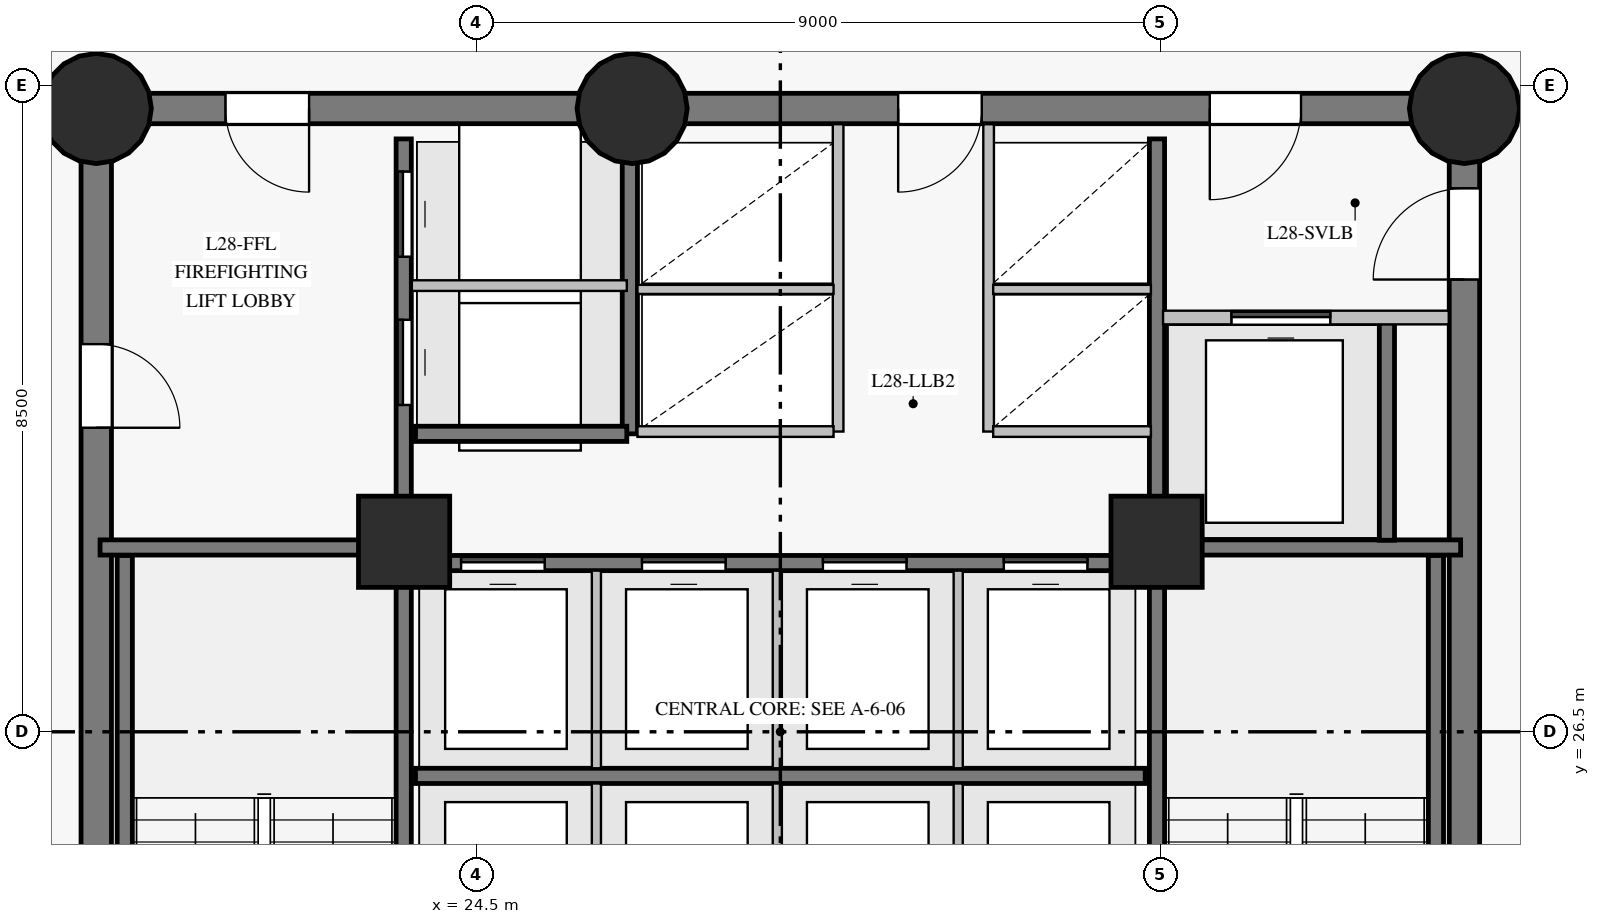
"""IFC4 building model, lengths in metres.
Left out: names, types, materials, properties, quantities, classifications, styles, units other than length and angle.
Written with IfcOpenShell. Run it as: python <this file> out.ifc"""

import sys

from ifc_helpers import new_model, si_unit, direction, frame, frame_2d, origin, origin_with_axes, origin_2d, place, context, subcontext, project, spatial, rectangle, circle, extrude, source, transform, mapped, element, fill, save


model = new_model("IFC4")
c1 = context("Model", 3, precision=1e-05, world=origin(), true_north=direction((0.0, 1.0)))
c2 = subcontext(c1, "Body", "Model", "MODEL_VIEW")
j1 = project(units=[si_unit("LENGTHUNIT", "METRE"), si_unit("PLANEANGLEUNIT", "RADIAN")], contexts=[c1])
p1 = place(None, origin())
s1 = spatial("IfcSite", under=j1, at=p1, CompositionType="ELEMENT")
p2 = place(p1, origin())
s2 = spatial("IfcBuilding", under=s1, at=p2, CompositionType="ELEMENT")
p3 = place(p2, frame((0.0, 0.0, 105.35)))
s3 = spatial("IfcBuildingStorey", under=s2, at=p3, CompositionType="ELEMENT", Elevation=105.35)
p4 = place(p3, frame((37.5, 18.3, 0.0), z_axis=(0.0, 0.0, 1.0), x_axis=(0.0, 1.0, 0.0)))
e1 = element("IfcWall", 1, at=p4, inside=s3, PredefinedType="SHEAR", context=c2, shape_type="SweptSolid", body=[
    extrude(rectangle(XDim=16.4, YDim=0.4, at=frame_2d((8.2, 0.0))), origin(), (0.0, 0.0, 1.0), 2.825),
])
p5 = place(p4, frame((14.15, 0.0, 0.0)))
e2 = element("IfcOpeningElement", 2, at=p5, cuts=e1, PredefinedType="OPENING", context=c2, shape_type="SweptSolid", body=[
    extrude(rectangle(XDim=1.2, YDim=2.15, at=frame_2d((0.6, 1.075))), frame((0.0, 0.21, 0.0), z_axis=(0.0, -1.0, 0.0), x_axis=(1.0, 0.0, 0.0)), (0.0, 0.0, 1.0), 0.42),
])
p6 = place(p3, frame((37.5, 34.7, 0.0), z_axis=(0.0, 0.0, 1.0), x_axis=(-1.0, 0.0, 0.0)))
e3 = element("IfcWall", 3, at=p6, inside=s3, PredefinedType="SHEAR", context=c2, shape_type="SweptSolid", body=[
    extrude(rectangle(XDim=10.95, YDim=0.4, at=frame_2d((5.475, 0.0))), origin(), (0.0, 0.0, 1.0), 2.825),
])
p7 = place(p6, frame((2.15, 0.0, 0.0)))
e4 = element("IfcOpeningElement", 4, at=p7, cuts=e3, PredefinedType="OPENING", context=c2, shape_type="SweptSolid", body=[
    extrude(rectangle(XDim=1.2, YDim=2.15, at=frame_2d((0.6, 1.075))), frame((0.0, 0.21, 0.0), z_axis=(0.0, -1.0, 0.0), x_axis=(1.0, 0.0, 0.0)), (0.0, 0.0, 1.0), 0.42),
])
p8 = place(p6, frame((6.35, 0.0, 0.0)))
e5 = element("IfcOpeningElement", 5, at=p8, cuts=e3, PredefinedType="OPENING", context=c2, shape_type="SweptSolid", body=[
    extrude(rectangle(XDim=1.1, YDim=2.15, at=frame_2d((0.55, 1.075))), frame((0.0, 0.21, 0.0), z_axis=(0.0, -1.0, 0.0), x_axis=(1.0, 0.0, 0.0)), (0.0, 0.0, 1.0), 0.42),
])
p9 = place(p3, frame((26.55, 34.7, 0.0), z_axis=(0.0, 0.0, 1.0), x_axis=(-1.0, 0.0, 0.0)))
e6 = element("IfcWall", 6, at=p9, inside=s3, PredefinedType="SHEAR", context=c2, shape_type="SweptSolid", body=[
    extrude(rectangle(XDim=7.05, YDim=0.4, at=frame_2d((3.525, 0.0))), origin(), (0.0, 0.0, 1.0), 2.825),
])
p10 = place(p9, frame((4.25, 0.0, 0.0)))
e7 = element("IfcOpeningElement", 7, at=p10, cuts=e6, PredefinedType="OPENING", context=c2, shape_type="SweptSolid", body=[
    extrude(rectangle(XDim=1.1, YDim=2.15, at=frame_2d((0.55, 1.075))), frame((0.0, 0.21, 0.0), z_axis=(0.0, -1.0, 0.0), x_axis=(1.0, 0.0, 0.0)), (0.0, 0.0, 1.0), 0.42),
])
p11 = place(p3, frame((19.5, 34.7, 0.0), z_axis=(0.0, 0.0, 1.0), x_axis=(0.0, -1.0, 0.0)))
e8 = element("IfcWall", 8, at=p11, inside=s3, PredefinedType="SHEAR", context=c2, shape_type="SweptSolid", body=[
    extrude(rectangle(XDim=16.4, YDim=0.4, at=frame_2d((8.2, 0.0))), origin(), (0.0, 0.0, 1.0), 2.825),
])
p12 = place(p11, frame((3.1, 0.0, 0.0)))
e9 = element("IfcOpeningElement", 9, at=p12, cuts=e8, PredefinedType="OPENING", context=c2, shape_type="SweptSolid", body=[
    extrude(rectangle(XDim=1.1, YDim=2.15, at=frame_2d((0.55, 1.075))), frame((0.0, 0.21, 0.0), z_axis=(0.0, -1.0, 0.0), x_axis=(1.0, 0.0, 0.0)), (0.0, 0.0, 1.0), 0.42),
])
m1 = source(origin_with_axes(), c2, "Body", "SweptSolid", [
    extrude(circle(Radius=0.725, at=origin_2d()), origin(), (0.0, 0.0, 1.0), 3.05),
])
for number, where, z_axis, x_axis in (
    (10, (19.5, 34.7, 0.0), (0.0, 0.0, 1.0), (1.0, 0.0, 0.0)),
    (11, (26.55, 34.7, 0.0), (0.0, 0.0, 1.0), (1.0, 0.0, 0.0)),
    (12, (37.5, 34.7, 0.0), (0.0, 0.0, 1.0), (1.0, 0.0, 0.0)),
):
    element("IfcColumn", number, at=place(p3, frame(where, z_axis=z_axis, x_axis=x_axis)), inside=s3, PredefinedType="COLUMN", context=c2, shape_type="MappedRepresentation", body=[
        mapped(m1, transform((0.0, 0.0, 0.0), scale=1.0)),
    ])
m2 = source(origin_with_axes(), c2, "Body", "SweptSolid", [
    extrude(rectangle(XDim=1.2, YDim=1.2, at=origin_2d()), origin(), (0.0, 0.0, 1.0), 3.05),
])
for number, where, z_axis, x_axis in (
    (13, (23.55, 29.0, 0.0), (0.0, 0.0, 1.0), (1.0, 0.0, 0.0)),
    (14, (33.45, 29.0, 0.0), (0.0, 0.0, 1.0), (1.0, 0.0, 0.0)),
):
    element("IfcColumn", number, at=place(p3, frame(where, z_axis=z_axis, x_axis=x_axis)), inside=s3, PredefinedType="COLUMN", context=c2, shape_type="MappedRepresentation", body=[
        mapped(m2, transform((0.0, 0.0, 0.0), scale=1.0)),
    ])
p13 = place(p3, frame((23.545, 18.7, 0.0), z_axis=(0.0, 0.0, 1.0), x_axis=(0.0, 1.0, 0.0)))
e15 = element("IfcWall", 15, at=p13, inside=s3, PredefinedType="SHEAR", context=c2, shape_type="SweptSolid", body=[
    extrude(rectangle(XDim=15.6, YDim=0.2, at=frame_2d((7.8, 0.0))), origin(), (0.0, 0.0, 1.0), 2.825),
])
p14 = place(p13, frame((2.75, 0.0, 0.0)))
e16 = element("IfcOpeningElement", 16, at=p14, cuts=e15, PredefinedType="OPENING", context=c2, shape_type="SweptSolid", body=[
    extrude(rectangle(XDim=1.15, YDim=2.15, at=frame_2d((0.575, 1.075))), frame((0.0, 0.11, 0.0), z_axis=(0.0, -1.0, 0.0), x_axis=(1.0, 0.0, 0.0)), (0.0, 0.0, 1.0), 0.22),
])
p15 = place(p13, frame((0.14, 0.0, 0.0)))
e17 = element("IfcOpeningElement", 17, at=p15, cuts=e15, PredefinedType="OPENING", context=c2, shape_type="SweptSolid", body=[
    extrude(rectangle(XDim=0.88, YDim=2.1, at=frame_2d((0.44, 1.05))), frame((0.0, 0.11, 0.0), z_axis=(0.0, -1.0, 0.0), x_axis=(1.0, 0.0, 0.0)), (0.0, 0.0, 1.0), 0.22),
])
p16 = place(p13, frame((1.36, 0.0, 0.0)))
e18 = element("IfcOpeningElement", 18, at=p16, cuts=e15, PredefinedType="OPENING", context=c2, shape_type="SweptSolid", body=[
    extrude(rectangle(XDim=0.88, YDim=2.1, at=frame_2d((0.44, 1.05))), frame((0.0, 0.11, 0.0), z_axis=(0.0, -1.0, 0.0), x_axis=(1.0, 0.0, 0.0)), (0.0, 0.0, 1.0), 0.22),
])
p17 = place(p13, frame((12.1, 0.0, 0.0)))
e19 = element("IfcOpeningElement", 19, at=p17, cuts=e15, PredefinedType="OPENING", context=c2, shape_type="SweptSolid", body=[
    extrude(rectangle(XDim=1.12, YDim=2.15, at=frame_2d((0.56, 1.075))), frame((0.0, 0.11, 0.0), z_axis=(0.0, -1.0, 0.0), x_axis=(1.0, 0.0, 0.0)), (0.0, 0.0, 1.0), 0.22),
])
p18 = place(p13, frame((14.05, 0.0, 0.0)))
e20 = element("IfcOpeningElement", 20, at=p18, cuts=e15, PredefinedType="OPENING", context=c2, shape_type="SweptSolid", body=[
    extrude(rectangle(XDim=1.12, YDim=2.15, at=frame_2d((0.56, 1.075))), frame((0.0, 0.11, 0.0), z_axis=(0.0, -1.0, 0.0), x_axis=(1.0, 0.0, 0.0)), (0.0, 0.0, 1.0), 0.22),
])
p19 = place(p3, frame((33.455, 18.7, 0.0), z_axis=(0.0, 0.0, 1.0), x_axis=(0.0, 1.0, 0.0)))
e21 = element("IfcWall", 21, at=p19, inside=s3, PredefinedType="SHEAR", context=c2, shape_type="SweptSolid", body=[
    extrude(rectangle(XDim=15.6, YDim=0.2, at=frame_2d((7.8, 0.0))), origin(), (0.0, 0.0, 1.0), 2.825),
])
p20 = place(p19, frame((2.75, 0.0, 0.0)))
e22 = element("IfcOpeningElement", 22, at=p20, cuts=e21, PredefinedType="OPENING", context=c2, shape_type="SweptSolid", body=[
    extrude(rectangle(XDim=1.15, YDim=2.15, at=frame_2d((0.575, 1.075))), frame((0.0, 0.11, 0.0), z_axis=(0.0, -1.0, 0.0), x_axis=(1.0, 0.0, 0.0)), (0.0, 0.0, 1.0), 0.22),
])
p21 = place(p19, frame((0.55, 0.0, 0.0)))
e23 = element("IfcOpeningElement", 23, at=p21, cuts=e21, PredefinedType="OPENING", context=c2, shape_type="SweptSolid", body=[
    extrude(rectangle(XDim=0.94, YDim=2.1, at=frame_2d((0.47, 1.05))), frame((0.0, 0.11, 0.0), z_axis=(0.0, -1.0, 0.0), x_axis=(1.0, 0.0, 0.0)), (0.0, 0.0, 1.0), 0.22),
])
p22 = place(p3, frame((23.7, 25.92, 0.0), z_axis=(0.0, 0.0, 1.0), x_axis=(1.0, 0.0, 0.0)))
e24 = element("IfcWall", 24, at=p22, inside=s3, PredefinedType="SHEAR", context=c2, shape_type="SweptSolid", body=[
    extrude(rectangle(XDim=9.6, YDim=0.2, at=frame_2d((4.8, 0.0))), origin(), (0.0, 0.0, 1.0), 2.825),
])
p23 = place(p3, frame((23.7, 28.72, 0.0), z_axis=(0.0, 0.0, 1.0), x_axis=(1.0, 0.0, 0.0)))
e25 = element("IfcWall", 25, at=p23, inside=s3, PredefinedType="SHEAR", context=c2, shape_type="SweptSolid", body=[
    extrude(rectangle(XDim=9.6, YDim=0.2, at=frame_2d((4.8, 0.0))), origin(), (0.0, 0.0, 1.0), 2.825),
])
p24 = place(p23, frame((0.6, 0.0, 0.0)))
e26 = element("IfcOpeningElement", 26, at=p24, cuts=e25, PredefinedType="OPENING", context=c2, shape_type="SweptSolid", body=[
    extrude(rectangle(XDim=1.1, YDim=2.15, at=frame_2d((0.55, 1.075))), frame((0.0, 0.11, 0.0), z_axis=(0.0, -1.0, 0.0), x_axis=(1.0, 0.0, 0.0)), (0.0, 0.0, 1.0), 0.22),
])
p25 = place(p23, frame((2.98, 0.0, 0.0)))
e27 = element("IfcOpeningElement", 27, at=p25, cuts=e25, PredefinedType="OPENING", context=c2, shape_type="SweptSolid", body=[
    extrude(rectangle(XDim=1.1, YDim=2.15, at=frame_2d((0.55, 1.075))), frame((0.0, 0.11, 0.0), z_axis=(0.0, -1.0, 0.0), x_axis=(1.0, 0.0, 0.0)), (0.0, 0.0, 1.0), 0.22),
])
p26 = place(p23, frame((5.36, 0.0, 0.0)))
e28 = element("IfcOpeningElement", 28, at=p26, cuts=e25, PredefinedType="OPENING", context=c2, shape_type="SweptSolid", body=[
    extrude(rectangle(XDim=1.1, YDim=2.15, at=frame_2d((0.55, 1.075))), frame((0.0, 0.11, 0.0), z_axis=(0.0, -1.0, 0.0), x_axis=(1.0, 0.0, 0.0)), (0.0, 0.0, 1.0), 0.22),
])
p27 = place(p23, frame((7.74, 0.0, 0.0)))
e29 = element("IfcOpeningElement", 29, at=p27, cuts=e25, PredefinedType="OPENING", context=c2, shape_type="SweptSolid", body=[
    extrude(rectangle(XDim=1.1, YDim=2.15, at=frame_2d((0.55, 1.075))), frame((0.0, 0.11, 0.0), z_axis=(0.0, -1.0, 0.0), x_axis=(1.0, 0.0, 0.0)), (0.0, 0.0, 1.0), 0.22),
])
for number, where, z_axis, x_axis in (
    (30, (19.875, 21.32, 0.0), (0.0, 0.0, 1.0), (0.0, 1.0, 0.0)),
    (31, (37.125, 21.32, 0.0), (0.0, 0.0, 1.0), (0.0, 1.0, 0.0)),
):
    element("IfcWall", number, at=place(p3, frame(where, z_axis=z_axis, x_axis=x_axis)), inside=s3, PredefinedType="SHEAR", context=c2, shape_type="SweptSolid", body=[
        extrude(rectangle(XDim=7.5, YDim=0.2, at=frame_2d((3.75, 0.0))), origin(), (0.0, 0.0, 1.0), 2.825),
    ])
for number, where, z_axis, x_axis in (
    (32, (33.455, 28.925, 0.0), (0.0, 0.0, 1.0), (1.0, 0.0, 0.0)),
    (33, (19.55, 28.925, 0.0), (0.0, 0.0, 1.0), (1.0, 0.0, 0.0)),
):
    element("IfcWall", number, at=place(p3, frame(where, z_axis=z_axis, x_axis=x_axis)), inside=s3, PredefinedType="SHEAR", context=c2, shape_type="SweptSolid", body=[
        extrude(rectangle(XDim=3.995, YDim=0.2, at=frame_2d((1.998, 0.0))), origin(), (0.0, 0.0, 1.0), 2.825),
    ])
p28 = place(p3, frame((26.52, 30.42, 0.0), z_axis=(0.0, 0.0, 1.0), x_axis=(0.0, 1.0, 0.0)))
e34 = element("IfcWall", 34, at=p28, inside=s3, PredefinedType="SHEAR", context=c2, shape_type="SweptSolid", body=[
    extrude(rectangle(XDim=3.86, YDim=0.2, at=frame_2d((1.93, 0.0))), origin(), (0.0, 0.0, 1.0), 2.825),
])
p29 = place(p3, frame((36.48, 29.02, 0.0), z_axis=(0.0, 0.0, 1.0), x_axis=(0.0, 1.0, 0.0)))
e35 = element("IfcWall", 35, at=p29, inside=s3, PredefinedType="SHEAR", context=c2, shape_type="SweptSolid", body=[
    extrude(rectangle(XDim=2.86, YDim=0.2, at=frame_2d((1.43, 0.0))), origin(), (0.0, 0.0, 1.0), 2.825),
])
p30 = place(p3, frame((23.7, 30.42, 0.0), z_axis=(0.0, 0.0, 1.0), x_axis=(1.0, 0.0, 0.0)))
e36 = element("IfcWall", 36, at=p30, inside=s3, PredefinedType="SHEAR", context=c2, shape_type="SweptSolid", body=[
    extrude(rectangle(XDim=2.78, YDim=0.2, at=frame_2d((1.39, 0.0))), origin(), (0.0, 0.0, 1.0), 2.825),
])
for number, where, z_axis, x_axis in (
    (37, (29.26, 30.45, 0.0), (0.0, 0.0, 1.0), (0.0, 1.0, 0.0)),
    (38, (31.24, 30.45, 0.0), (0.0, 0.0, 1.0), (0.0, 1.0, 0.0)),
):
    element("IfcWall", number, at=place(p3, frame(where, z_axis=z_axis, x_axis=x_axis)), inside=s3, PredefinedType="PARTITIONING", context=c2, shape_type="SweptSolid", body=[
        extrude(rectangle(XDim=4.043, YDim=0.14, at=frame_2d((2.021, 0.0))), origin(), (0.0, 0.0, 1.0), 2.825),
    ])
p31 = place(p3, frame((33.535, 31.95, 0.0), z_axis=(0.0, 0.0, 1.0), x_axis=(1.0, 0.0, 0.0)))
e39 = element("IfcWall", 39, at=p31, inside=s3, PredefinedType="PARTITIONING", context=c2, shape_type="SweptSolid", body=[
    extrude(rectangle(XDim=3.759, YDim=0.18, at=frame_2d((1.879, 0.0))), origin(), (0.0, 0.0, 1.0), 2.825),
])
p32 = place(p31, frame((0.9, 0.0, 0.0)))
e40 = element("IfcOpeningElement", 40, at=p32, cuts=e39, PredefinedType="OPENING", context=c2, shape_type="SweptSolid", body=[
    extrude(rectangle(XDim=1.3, YDim=2.2, at=frame_2d((0.65, 1.1))), frame((0.0, 0.1, 0.0), z_axis=(0.0, -1.0, 0.0), x_axis=(1.0, 0.0, 0.0)), (0.0, 0.0, 1.0), 0.2),
])
p33 = place(p3, frame((23.652, 32.37, 0.0), z_axis=(0.0, 0.0, 1.0), x_axis=(1.0, 0.0, 0.0)))
e41 = element("IfcWall", 41, at=p33, inside=s3, PredefinedType="PARTITIONING", context=c2, shape_type="SweptSolid", body=[
    extrude(rectangle(XDim=2.828, YDim=0.14, at=frame_2d((1.414, 0.0))), origin(), (0.0, 0.0, 1.0), 2.825),
])
for number, where, z_axis, x_axis in (
    (42, (26.08, 23.22, 0.0), (0.0, 0.0, 1.0), (0.0, 1.0, 0.0)),
    (43, (28.46, 23.22, 0.0), (0.0, 0.0, 1.0), (0.0, 1.0, 0.0)),
    (44, (30.84, 23.22, 0.0), (0.0, 0.0, 1.0), (0.0, 1.0, 0.0)),
    (45, (26.08, 26.02, 0.0), (0.0, 0.0, 1.0), (0.0, 1.0, 0.0)),
    (46, (28.46, 26.02, 0.0), (0.0, 0.0, 1.0), (0.0, 1.0, 0.0)),
    (47, (30.84, 26.02, 0.0), (0.0, 0.0, 1.0), (0.0, 1.0, 0.0)),
):
    element("IfcWall", number, at=place(p3, frame(where, z_axis=z_axis, x_axis=x_axis)), inside=s3, PredefinedType="PARTITIONING", context=c2, shape_type="SweptSolid", body=[
        extrude(rectangle(XDim=2.6, YDim=0.12, at=frame_2d((1.3, 0.0))), origin(), (0.0, 0.0, 1.0), 2.825),
    ])
p34 = place(p3, frame((26.62, 30.45, 0.0), z_axis=(0.0, 0.0, 1.0), x_axis=(1.0, 0.0, 0.0)))
e48 = element("IfcWall", 48, at=p34, inside=s3, PredefinedType="PARTITIONING", context=c2, shape_type="SweptSolid", body=[
    extrude(rectangle(XDim=2.58, YDim=0.14, at=frame_2d((1.29, 0.0))), origin(), (0.0, 0.0, 1.0), 2.825),
])
p35 = place(p3, frame((26.62, 32.32, 0.0), z_axis=(0.0, 0.0, 1.0), x_axis=(1.0, 0.0, 0.0)))
e49 = element("IfcWall", 49, at=p35, inside=s3, PredefinedType="PARTITIONING", context=c2, shape_type="SweptSolid", body=[
    extrude(rectangle(XDim=2.58, YDim=0.12, at=frame_2d((1.29, 0.0))), origin(), (0.0, 0.0, 1.0), 2.825),
])
p36 = place(p3, frame((31.3, 30.45, 0.0), z_axis=(0.0, 0.0, 1.0), x_axis=(1.0, 0.0, 0.0)))
e50 = element("IfcWall", 50, at=p36, inside=s3, PredefinedType="PARTITIONING", context=c2, shape_type="SweptSolid", body=[
    extrude(rectangle(XDim=2.075, YDim=0.14, at=frame_2d((1.038, 0.0))), origin(), (0.0, 0.0, 1.0), 2.825),
])
p37 = place(p3, frame((31.3, 32.32, 0.0), z_axis=(0.0, 0.0, 1.0), x_axis=(1.0, 0.0, 0.0)))
e51 = element("IfcWall", 51, at=p37, inside=s3, PredefinedType="PARTITIONING", context=c2, shape_type="SweptSolid", body=[
    extrude(rectangle(XDim=2.075, YDim=0.12, at=frame_2d((1.038, 0.0))), origin(), (0.0, 0.0, 1.0), 2.825),
])
m3 = source(origin_with_axes(), c2, "Body", "SweptSolid", [
    extrude(rectangle(XDim=1.1, YDim=2.15, at=frame_2d((0.55, 1.075))), frame((0.0, 0.025, 0.0), z_axis=(0.0, -1.0, 0.0), x_axis=(1.0, 0.0, 0.0)), (0.0, 0.0, 1.0), 0.05),
])
p38 = place(p10, origin())
e52 = element("IfcDoor", 52, at=p38, inside=s3, OperationType="SINGLE_SWING_LEFT", PredefinedType="DOOR", context=c2, shape_type="MappedRepresentation", body=[
    mapped(m3, transform((0.0, 0.0, 0.0), scale=1.0)),
])
fill(e7, e52)
p39 = place(p12, origin())
e53 = element("IfcDoor", 53, at=p39, inside=s3, OperationType="SINGLE_SWING_RIGHT", PredefinedType="DOOR", context=c2, shape_type="MappedRepresentation", body=[
    mapped(m3, transform((0.0, 0.0, 0.0), scale=1.0)),
])
fill(e9, e53)
m4 = source(origin_with_axes(), c2, "Body", "SweptSolid", [
    extrude(rectangle(XDim=1.2, YDim=2.15, at=frame_2d((0.6, 1.075))), frame((0.0, 0.025, 0.0), z_axis=(0.0, -1.0, 0.0), x_axis=(1.0, 0.0, 0.0)), (0.0, 0.0, 1.0), 0.05),
])
p40 = place(p5, origin())
e54 = element("IfcDoor", 54, at=p40, inside=s3, OperationType="SINGLE_SWING_LEFT", PredefinedType="DOOR", context=c2, shape_type="MappedRepresentation", body=[
    mapped(m4, transform((0.0, 0.0, 0.0), scale=1.0)),
])
fill(e2, e54)
p41 = place(p7, origin())
e55 = element("IfcDoor", 55, at=p41, inside=s3, OperationType="SINGLE_SWING_RIGHT", PredefinedType="DOOR", context=c2, shape_type="MappedRepresentation", body=[
    mapped(m4, transform((0.0, 0.0, 0.0), scale=1.0)),
])
fill(e4, e55)
m5 = source(origin_with_axes(), c2, "Body", "SweptSolid", [
    extrude(rectangle(XDim=1.3, YDim=2.2, at=frame_2d((0.65, 1.1))), frame((0.0, 0.025, 0.0), z_axis=(0.0, -1.0, 0.0), x_axis=(1.0, 0.0, 0.0)), (0.0, 0.0, 1.0), 0.05),
])
p42 = place(p32, origin())
e56 = element("IfcDoor", 56, at=p42, inside=s3, OperationType="SLIDING_TO_LEFT", PredefinedType="DOOR", context=c2, shape_type="MappedRepresentation", body=[
    mapped(m5, transform((0.0, 0.0, 0.0), scale=1.0)),
])
fill(e40, e56)
p43 = place(p24, origin())
e57 = element("IfcDoor", 57, at=p43, inside=s3, OperationType="SLIDING_TO_LEFT", PredefinedType="DOOR", context=c2, shape_type="MappedRepresentation", body=[
    mapped(m3, transform((0.0, 0.0, 0.0), scale=1.0)),
])
fill(e26, e57)
p44 = place(p25, origin())
e58 = element("IfcDoor", 58, at=p44, inside=s3, OperationType="SLIDING_TO_RIGHT", PredefinedType="DOOR", context=c2, shape_type="MappedRepresentation", body=[
    mapped(m3, transform((0.0, 0.0, 0.0), scale=1.0)),
])
fill(e27, e58)
p45 = place(p26, origin())
e59 = element("IfcDoor", 59, at=p45, inside=s3, OperationType="SLIDING_TO_LEFT", PredefinedType="DOOR", context=c2, shape_type="MappedRepresentation", body=[
    mapped(m3, transform((0.0, 0.0, 0.0), scale=1.0)),
])
fill(e28, e59)
p46 = place(p27, origin())
e60 = element("IfcDoor", 60, at=p46, inside=s3, OperationType="SLIDING_TO_RIGHT", PredefinedType="DOOR", context=c2, shape_type="MappedRepresentation", body=[
    mapped(m3, transform((0.0, 0.0, 0.0), scale=1.0)),
])
fill(e29, e60)
p47 = place(p8, origin())
e61 = element("IfcDoor", 61, at=p47, inside=s3, OperationType="SINGLE_SWING_RIGHT", PredefinedType="DOOR", context=c2, shape_type="MappedRepresentation", body=[
    mapped(m3, transform((0.0, 0.0, 0.0), scale=1.0)),
])
fill(e5, e61)
m6 = source(origin_with_axes(), c2, "Body", "SweptSolid", [
    extrude(rectangle(XDim=1.12, YDim=2.15, at=frame_2d((0.56, 1.075))), frame((0.0, 0.025, 0.0), z_axis=(0.0, -1.0, 0.0), x_axis=(1.0, 0.0, 0.0)), (0.0, 0.0, 1.0), 0.05),
])
p48 = place(p17, origin())
e62 = element("IfcDoor", 62, at=p48, inside=s3, OperationType="SLIDING_TO_LEFT", PredefinedType="DOOR", context=c2, shape_type="MappedRepresentation", body=[
    mapped(m6, transform((0.0, 0.0, 0.0), scale=1.0)),
])
fill(e19, e62)
p49 = place(p18, origin())
e63 = element("IfcDoor", 63, at=p49, inside=s3, OperationType="SLIDING_TO_RIGHT", PredefinedType="DOOR", context=c2, shape_type="MappedRepresentation", body=[
    mapped(m6, transform((0.0, 0.0, 0.0), scale=1.0)),
])
fill(e20, e63)
save(model, sys.argv[1])
